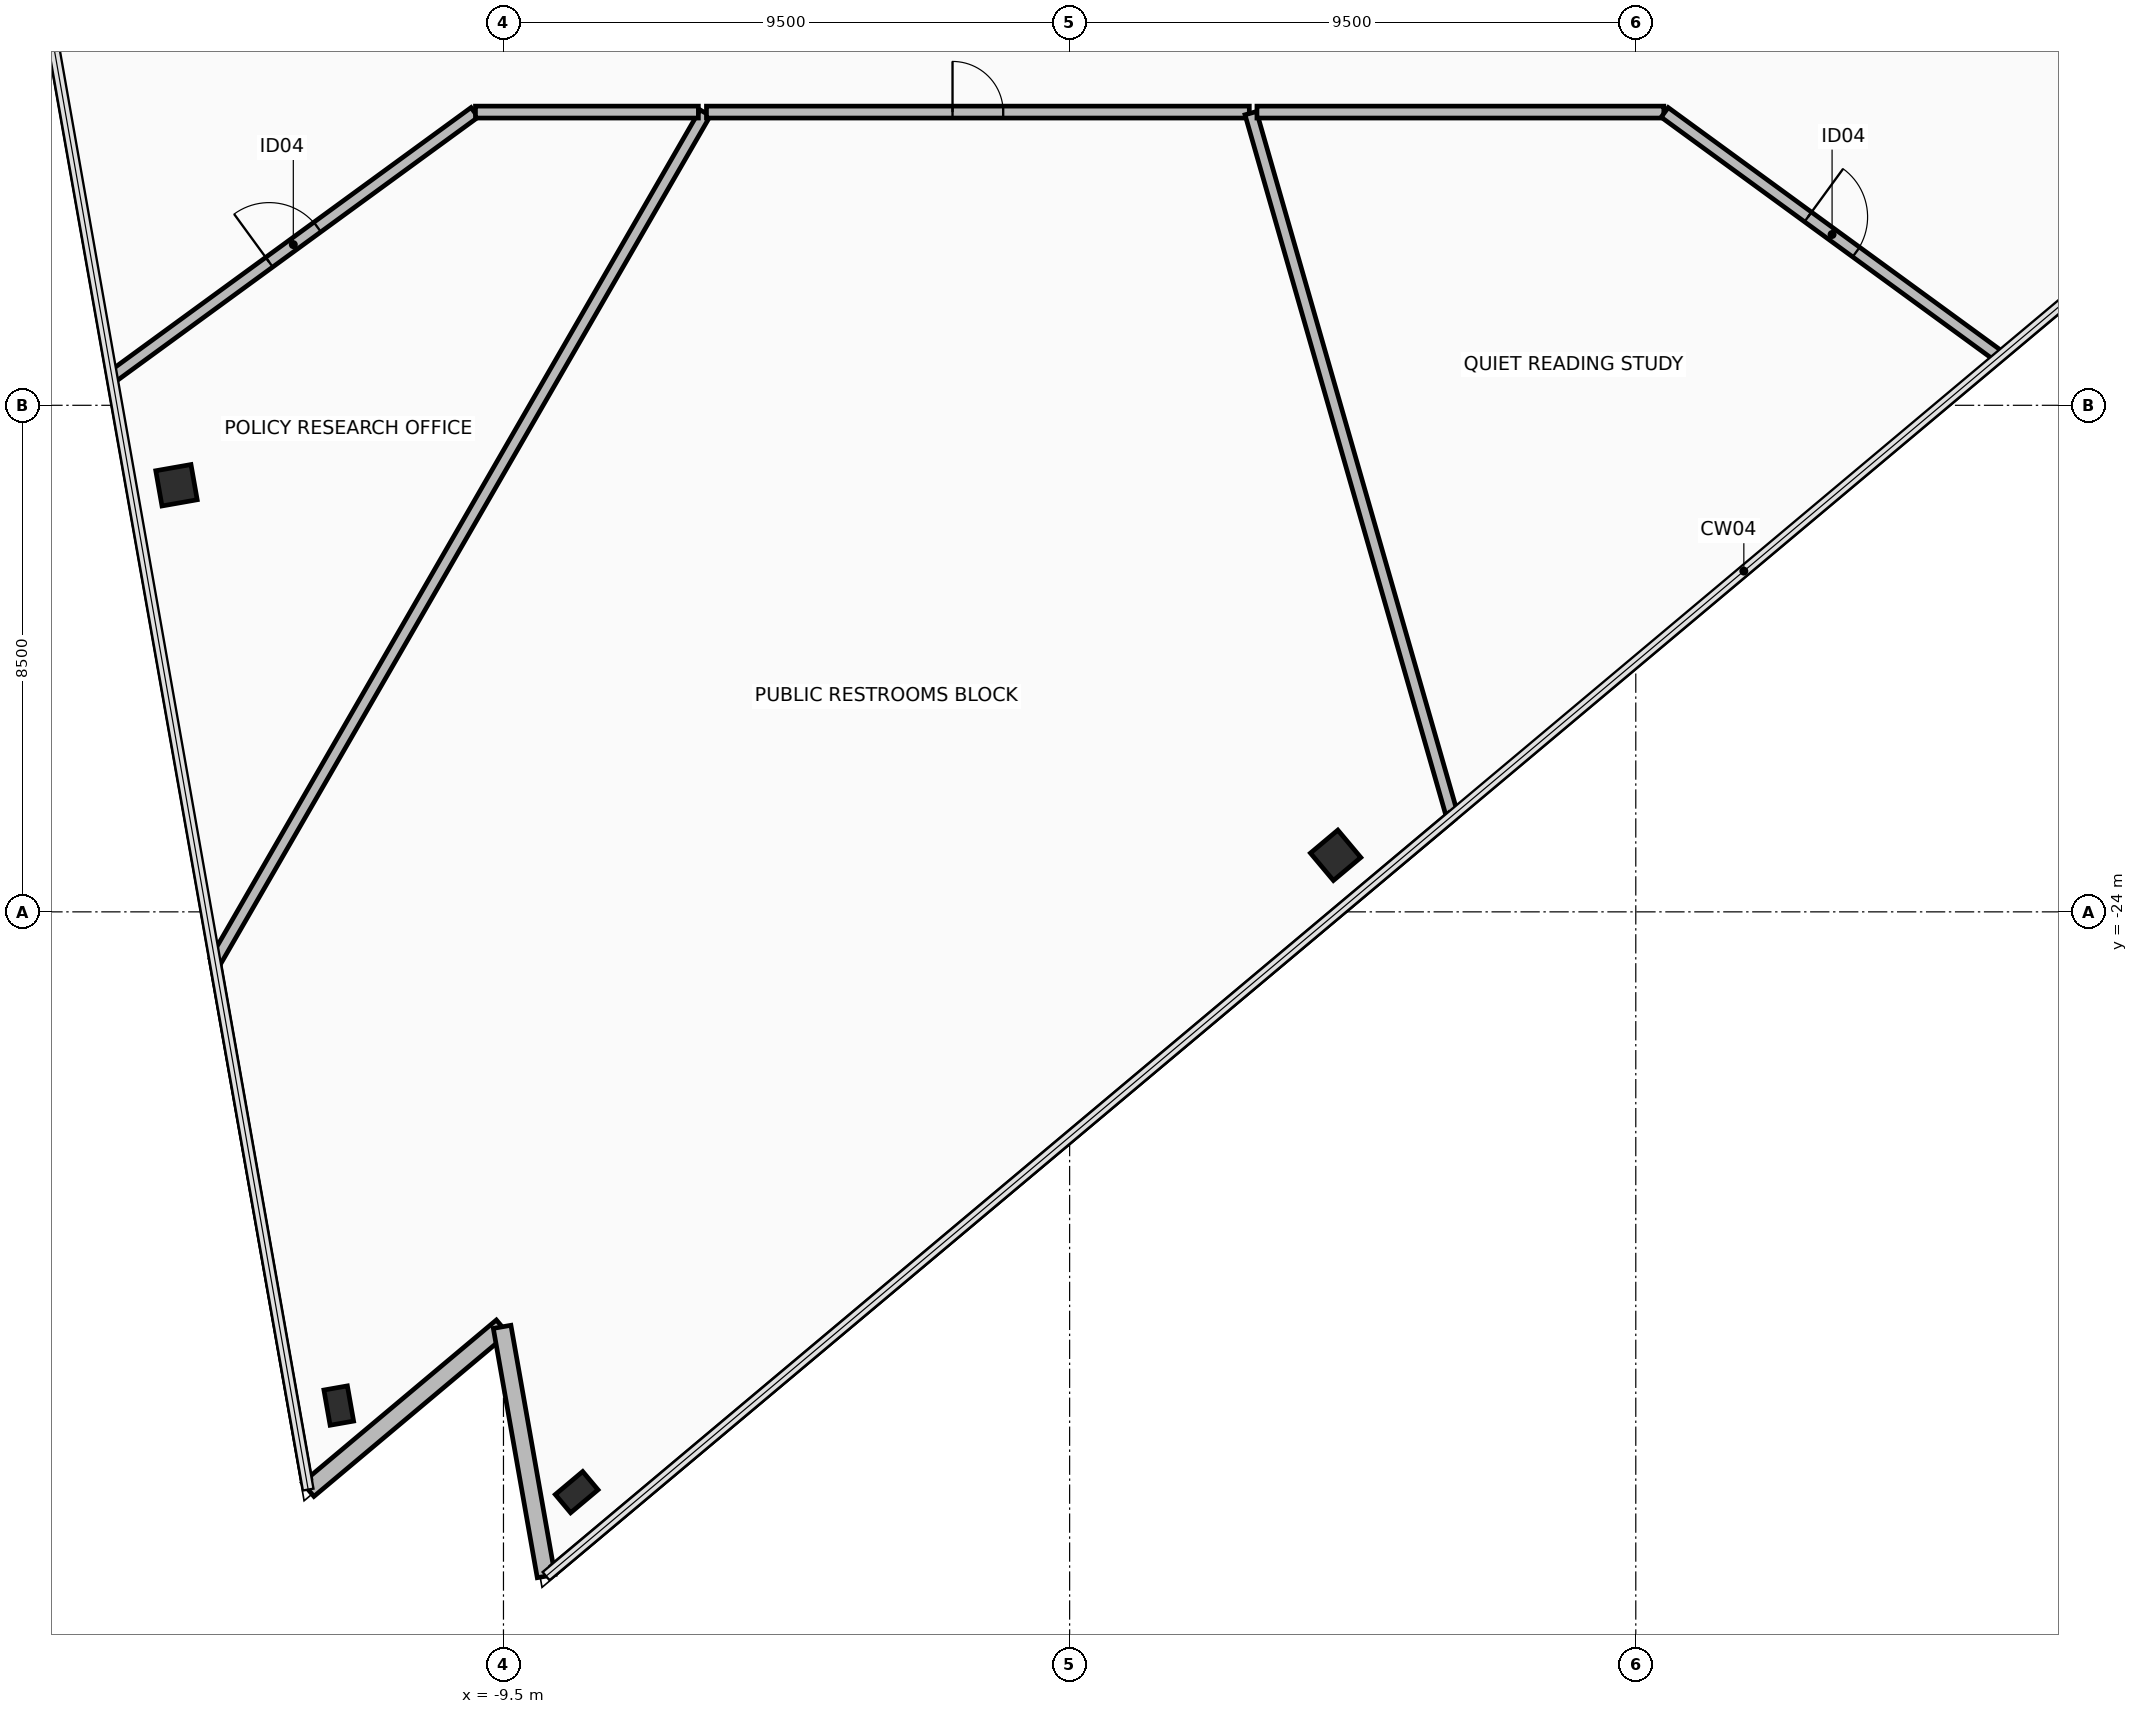
"""IFC4 building model, lengths in metres.
Left out: names, types, materials, properties, quantities, classifications, styles, units other than length and angle.
Written with IfcOpenShell. Run it as: python <this file> out.ifc"""

import sys

from ifc_helpers import new_model, si_unit, direction, frame, frame_2d, origin, origin_2d, place, context, subcontext, project, spatial, rectangle, hollow_rectangle, extrude, element, fill, save


model = new_model("IFC4")
c1 = context("Model", 3, precision=1e-05, world=origin(), true_north=direction((0.0, 1.0)))
c2 = subcontext(c1, "Body", "Model", "MODEL_VIEW")
j1 = project(units=[si_unit("LENGTHUNIT", "METRE"), si_unit("PLANEANGLEUNIT", "RADIAN")], contexts=[c1])
p1 = place(None, origin())
s1 = spatial("IfcSite", under=j1, at=p1, CompositionType="ELEMENT")
p2 = place(p1, origin())
s2 = spatial("IfcBuilding", under=s1, at=p2, CompositionType="ELEMENT")
p3 = place(p2, frame((0.0, 0.0, 174.1)))
s3 = spatial("IfcBuildingStorey", under=s2, at=p3, CompositionType="ELEMENT", Elevation=174.1)
p4 = place(p3, frame((-14.987, -16.842, 0.0), z_axis=(0.0, 0.0, 1.0), x_axis=(-0.173648177667, 0.984807753012, 0.0)))
e1 = element("IfcColumn", 1, at=p4, inside=s3, PredefinedType="COLUMN", context=c2, shape_type="SweptSolid", body=[
    extrude(hollow_rectangle(XDim=0.6, YDim=0.6, WallThickness=0.036, at=origin_2d()), origin(), (0.0, 0.0, 1.0), 3.6),
])
for number, where, z_axis, x_axis in (
    (2, (-12.264, -32.284, 0.0), (0.0, 0.0, 1.0), (-0.174, 0.985, 0.0)),
    (3, (-8.272, -33.737, 0.0), (0.0, 0.0, 1.0), (0.766, 0.643, 0.0)),
):
    element("IfcColumn", number, at=place(p3, frame(where, z_axis=z_axis, x_axis=x_axis)), inside=s3, PredefinedType="COLUMN", context=c2, shape_type="SweptSolid", body=[
        extrude(hollow_rectangle(XDim=0.4, YDim=0.6, WallThickness=0.03, at=origin_2d()), origin(), (0.0, 0.0, 1.0), 3.6),
    ])
p5 = place(p3, frame((4.463, -23.051, 0.0), z_axis=(0.0, 0.0, 1.0), x_axis=(0.766043321242, 0.642788946685, 0.0)))
e4 = element("IfcColumn", 4, at=p5, inside=s3, PredefinedType="COLUMN", context=c2, shape_type="SweptSolid", body=[
    extrude(hollow_rectangle(XDim=0.6, YDim=0.6, WallThickness=0.036, at=origin_2d()), origin(), (0.0, 0.0, 1.0), 3.6),
])
for number, where, z_axis, x_axis in (
    (5, (-12.777, -33.694, 0.0), (0.0, 0.0, 1.0), (0.766, 0.643, 0.0)),
    (6, (-9.523, -30.963, 0.0), (0.0, 0.0, 1.0), (0.174, -0.985, 0.0)),
):
    element("IfcWall", number, at=place(p3, frame(where, z_axis=z_axis, x_axis=x_axis)), inside=s3, PredefinedType="STANDARD", context=c2, shape_type="SweptSolid", body=[
        extrude(rectangle(XDim=4.248, YDim=0.3, at=frame_2d((2.124, 0.0))), origin(), (0.0, 0.0, 1.0), 2.715),
    ])
p6 = place(p3, frame((-12.808, -33.518, 0.0), z_axis=(0.0, 0.0, 1.0), x_axis=(-0.173647747775, 0.984807828814, 0.0)))
e7 = element("IfcWall", 7, at=p6, inside=s3, PredefinedType="PARTITIONING", context=c2, shape_type="SweptSolid", body=[
    extrude(rectangle(XDim=8.807, YDim=0.15, at=frame_2d((4.403, 0.0))), origin(), (0.0, 0.0, 1.0), 3.42),
])
p7 = place(p3, frame((-14.334, -24.828, 0.0), z_axis=(0.0, 0.0, 1.0), x_axis=(0.500004877517, 0.866022587731, 0.0)))
e8 = element("IfcWall", 8, at=p7, inside=s3, PredefinedType="PARTITIONING", context=c2, shape_type="SweptSolid", body=[
    extrude(rectangle(XDim=16.437, YDim=0.2, at=frame_2d((8.219, 0.0))), origin(), (0.0, 0.0, 1.0), 2.715),
])
p8 = place(p3, frame((-6.094, -10.58, 0.0), z_axis=(0.0, 0.0, 1.0), x_axis=(1.0, 0.0, 0.0)))
e9 = element("IfcWall", 9, at=p8, inside=s3, PredefinedType="PARTITIONING", context=c2, shape_type="SweptSolid", body=[
    extrude(rectangle(XDim=9.109, YDim=0.2, at=frame_2d((4.554, 0.0))), origin(), (0.0, 0.0, 1.0), 3.42),
])
p9 = place(p8, frame((4.129, 0.0, 0.0)))
e10 = element("IfcOpeningElement", 10, at=p9, cuts=e9, PredefinedType="OPENING", context=c2, shape_type="SweptSolid", body=[
    extrude(rectangle(XDim=0.85, YDim=2.1, at=frame_2d((0.425, 1.05))), frame((0.0, 0.11, 0.0), z_axis=(0.0, -1.0, 0.0), x_axis=(1.0, 0.0, 0.0)), (0.0, 0.0, 1.0), 0.22),
])
p10 = place(p3, frame((3.039, -10.598, 0.0), z_axis=(0.0, 0.0, 1.0), x_axis=(0.275629193235, -0.961264036484, 0.0)))
e11 = element("IfcWall", 11, at=p10, inside=s3, PredefinedType="PARTITIONING", context=c2, shape_type="SweptSolid", body=[
    extrude(rectangle(XDim=12.249, YDim=0.2, at=frame_2d((6.125, 0.0))), origin(), (0.0, 0.0, 1.0), 2.715),
])
p11 = place(p3, frame((6.407, -22.399, 0.0), z_axis=(0.0, 0.0, 1.0), x_axis=(-0.766037823796, -0.642795498206, 0.0)))
e12 = element("IfcWall", 12, at=p11, inside=s3, PredefinedType="PARTITIONING", context=c2, shape_type="SweptSolid", body=[
    extrude(rectangle(XDim=19.653, YDim=0.15, at=frame_2d((9.827, 0.0))), origin(), (0.0, 0.0, 1.0), 3.42),
])
p12 = place(p3, frame((-16.069, -15.024, 0.0), z_axis=(0.0, 0.0, 1.0), x_axis=(0.807835167635, 0.589408467815, 0.0)))
e13 = element("IfcWall", 13, at=p12, inside=s3, PredefinedType="PARTITIONING", context=c2, shape_type="SweptSolid", body=[
    extrude(rectangle(XDim=7.531, YDim=0.2, at=frame_2d((3.766, 0.0))), origin(), (0.0, 0.0, 1.0), 2.715),
])
p13 = place(p12, frame((3.266, 0.0, 0.0)))
e14 = element("IfcOpeningElement", 14, at=p13, cuts=e13, PredefinedType="OPENING", context=c2, shape_type="SweptSolid", body=[
    extrude(rectangle(XDim=1.0, YDim=2.15, at=frame_2d((0.5, 1.075))), frame((0.0, 0.11, 0.0), z_axis=(0.0, -1.0, 0.0), x_axis=(1.0, 0.0, 0.0)), (0.0, 0.0, 1.0), 0.22),
])
p14 = place(p3, frame((-9.97, -10.58, 0.0), z_axis=(0.0, 0.0, 1.0), x_axis=(1.0, 0.0, 0.0)))
e15 = element("IfcWall", 15, at=p14, inside=s3, PredefinedType="PARTITIONING", context=c2, shape_type="SweptSolid", body=[
    extrude(rectangle(XDim=3.74, YDim=0.2, at=frame_2d((1.87, 0.0))), origin(), (0.0, 0.0, 1.0), 2.865),
])
p15 = place(p3, frame((3.143, -10.58, 0.0), z_axis=(0.0, 0.0, 1.0), x_axis=(1.0, 0.0, 0.0)))
e16 = element("IfcWall", 16, at=p15, inside=s3, PredefinedType="PARTITIONING", context=c2, shape_type="SweptSolid", body=[
    extrude(rectangle(XDim=6.827, YDim=0.2, at=frame_2d((3.414, 0.0))), origin(), (0.0, 0.0, 1.0), 2.865),
])
p16 = place(p3, frame((9.985, -10.585, 0.0), z_axis=(0.0, 0.0, 1.0), x_axis=(0.807846973011, -0.589392287189, 0.0)))
e17 = element("IfcWall", 17, at=p16, inside=s3, PredefinedType="PARTITIONING", context=c2, shape_type="SweptSolid", body=[
    extrude(rectangle(XDim=6.954, YDim=0.2, at=frame_2d((3.477, 0.0))), origin(), (0.0, 0.0, 1.0), 2.715),
])
p17 = place(p16, frame((2.977, 0.0, 0.0)))
e18 = element("IfcOpeningElement", 18, at=p17, cuts=e17, PredefinedType="OPENING", context=c2, shape_type="SweptSolid", body=[
    extrude(rectangle(XDim=1.0, YDim=2.15, at=frame_2d((0.5, 1.075))), frame((0.0, 0.11, 0.0), z_axis=(0.0, -1.0, 0.0), x_axis=(1.0, 0.0, 0.0)), (0.0, 0.0, 1.0), 0.22),
])
p18 = place(p3, frame((20.247, -10.765, 0.0), z_axis=(0.0, 0.0, 1.0), x_axis=(-0.882947271035, 0.469472168048, 0.0)))
e19 = element("IfcWall", 19, at=p18, inside=s3, PredefinedType="PARTITIONING", context=c2, shape_type="SweptSolid", body=[
    extrude(rectangle(XDim=9.461, YDim=0.2, at=frame_2d((4.73, 0.0))), origin(), (0.0, 0.0, 1.0), 2.715),
])
p19 = place(p9, origin())
e20 = element("IfcDoor", 20, at=p19, inside=s3, OperationType="SINGLE_SWING_RIGHT", PredefinedType="DOOR", context=c2, shape_type="SweptSolid", body=[
    extrude(rectangle(XDim=0.85, YDim=2.1, at=frame_2d((0.425, 1.05))), frame((0.0, 0.025, 0.0), z_axis=(0.0, -1.0, 0.0), x_axis=(1.0, 0.0, 0.0)), (0.0, 0.0, 1.0), 0.05),
])
fill(e10, e20)
p20 = place(p13, origin())
e21 = element("IfcDoor", 21, at=p20, inside=s3, OperationType="SINGLE_SWING_RIGHT", PredefinedType="DOOR", context=c2, shape_type="SweptSolid", body=[
    extrude(rectangle(XDim=1.0, YDim=2.15, at=frame_2d((0.5, 1.075))), frame((0.0, 0.025, 0.0), z_axis=(0.0, -1.0, 0.0), x_axis=(1.0, 0.0, 0.0)), (0.0, 0.0, 1.0), 0.05),
])
fill(e14, e21)
p21 = place(p17, origin())
e22 = element("IfcDoor", 22, at=p21, inside=s3, OperationType="SINGLE_SWING_RIGHT", PredefinedType="DOOR", context=c2, shape_type="SweptSolid", body=[
    extrude(rectangle(XDim=1.0, YDim=2.15, at=frame_2d((0.5, 1.075))), frame((0.0, 0.025, 0.0), z_axis=(0.0, -1.0, 0.0), x_axis=(1.0, 0.0, 0.0)), (0.0, 0.0, 1.0), 0.05),
])
fill(e18, e22)
save(model, sys.argv[1])
